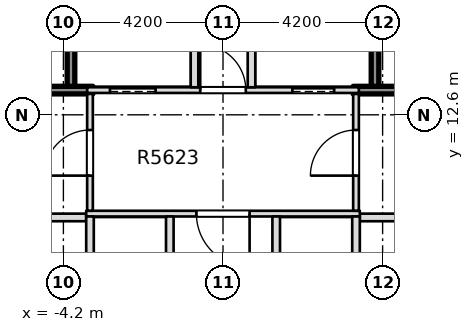
"""IFC4 building model, lengths in metres.
Left out: names, types, materials, properties, quantities, classifications, styles, units other than length and angle.
Written with IfcOpenShell. Run it as: python <this file> out.ifc"""

import sys

from ifc_helpers import new_model, si_unit, direction, frame, frame_2d, origin, place, context, subcontext, project, spatial, rectangle, extrude, element, fill, save


model = new_model("IFC4")
c1 = context("Model", 3, precision=1e-05, world=origin(), true_north=direction((0.0, 1.0)))
c2 = subcontext(c1, "Body", "Model", "MODEL_VIEW")
j1 = project(units=[si_unit("LENGTHUNIT", "METRE"), si_unit("PLANEANGLEUNIT", "RADIAN")], contexts=[c1])
p1 = place(None, origin())
s1 = spatial("IfcSite", under=j1, at=p1, CompositionType="ELEMENT")
p2 = place(p1, origin())
s2 = spatial("IfcBuilding", under=s1, at=p2, CompositionType="ELEMENT")
p3 = place(p2, frame((0.0, 0.0, 213.5)))
s3 = spatial("IfcBuildingStorey", under=s2, at=p3, CompositionType="ELEMENT", Elevation=213.5)
p4 = place(p3, frame((-7.5, 9.9, 0.0), z_axis=(0.0, 0.0, 1.0), x_axis=(1.0, 0.0, 0.0)))
e1 = element("IfcWall", 1, at=p4, inside=s3, PredefinedType="PARTITIONING", context=c2, shape_type="SweptSolid", body=[
    extrude(rectangle(XDim=3.9, YDim=0.2, at=frame_2d((1.95, 0.0))), origin(), (0.0, 0.0, 1.0), 3.0),
])
p5 = place(p4, frame((0.55, 0.0, 0.0)))
e2 = element("IfcOpeningElement", 2, at=p5, cuts=e1, PredefinedType="OPENING", context=c2, shape_type="SweptSolid", body=[
    extrude(rectangle(XDim=1.1, YDim=2.1, at=frame_2d((0.55, 1.05))), frame((0.0, 0.11, 0.0), z_axis=(0.0, -1.0, 0.0), x_axis=(1.0, 0.0, 0.0)), (0.0, 0.0, 1.0), 0.22),
])
p6 = place(p3, frame((3.6, 9.9, 0.0), z_axis=(0.0, 0.0, 1.0), x_axis=(1.0, 0.0, 0.0)))
e3 = element("IfcWall", 3, at=p6, inside=s3, PredefinedType="PARTITIONING", context=c2, shape_type="SweptSolid", body=[
    extrude(rectangle(XDim=3.9, YDim=0.2, at=frame_2d((1.95, 0.0))), origin(), (0.0, 0.0, 1.0), 3.0),
])
p7 = place(p6, frame((2.25, 0.0, 0.0)))
e4 = element("IfcOpeningElement", 4, at=p7, cuts=e3, PredefinedType="OPENING", context=c2, shape_type="SweptSolid", body=[
    extrude(rectangle(XDim=1.1, YDim=2.1, at=frame_2d((0.55, 1.05))), frame((0.0, 0.11, 0.0), z_axis=(0.0, -1.0, 0.0), x_axis=(1.0, 0.0, 0.0)), (0.0, 0.0, 1.0), 0.22),
])
p8 = place(p3, frame((-3.6, 10.0, 0.0), z_axis=(0.0, 0.0, 1.0), x_axis=(1.0, 0.0, 0.0)))
e5 = element("IfcWall", 5, at=p8, inside=s3, PredefinedType="PARTITIONING", context=c2, shape_type="SweptSolid", body=[
    extrude(rectangle(XDim=7.2, YDim=0.15, at=frame_2d((3.6, 0.0))), origin(), (0.0, 0.0, 1.0), 3.0),
])
p9 = place(p8, frame((2.9, 0.0, 0.0)))
e6 = element("IfcOpeningElement", 6, at=p9, cuts=e5, PredefinedType="OPENING", context=c2, shape_type="SweptSolid", body=[
    extrude(rectangle(XDim=1.4, YDim=2.1, at=frame_2d((0.7, 1.05))), frame((0.0, 0.085, 0.0), z_axis=(0.0, -1.0, 0.0), x_axis=(1.0, 0.0, 0.0)), (0.0, 0.0, 1.0), 0.17),
])
p10 = place(p3, frame((-7.5, 13.25, 0.0), z_axis=(0.0, 0.0, 1.0), x_axis=(1.0, 0.0, 0.0)))
e7 = element("IfcWall", 7, at=p10, inside=s3, PredefinedType="SOLIDWALL", context=c2, shape_type="SweptSolid", body=[
    extrude(rectangle(XDim=4.075, YDim=0.2, at=frame_2d((2.038, 0.0))), origin(), (0.0, 0.0, 1.0), 3.0),
])
p11 = place(p10, frame((1.05, 0.0, 0.0)))
e8 = element("IfcOpeningElement", 8, at=p11, cuts=e7, PredefinedType="OPENING", context=c2, shape_type="SweptSolid", body=[
    extrude(rectangle(XDim=1.2, YDim=2.1, at=frame_2d((0.6, 1.05))), frame((0.0, 0.11, 0.0), z_axis=(0.0, -1.0, 0.0), x_axis=(1.0, 0.0, 0.0)), (0.0, 0.0, 1.0), 0.22),
])
p12 = place(p3, frame((-3.575, 13.25, 0.0), z_axis=(0.0, 0.0, 1.0), x_axis=(1.0, 0.0, 0.0)))
e9 = element("IfcWall", 9, at=p12, inside=s3, PredefinedType="PARTITIONING", context=c2, shape_type="SweptSolid", body=[
    extrude(rectangle(XDim=7.15, YDim=0.15, at=frame_2d((3.575, 0.0))), origin(), (0.0, 0.0, 1.0), 3.0),
])
p13 = place(p12, frame((0.6, 0.0, 0.0)))
e10 = element("IfcOpeningElement", 10, at=p13, cuts=e9, PredefinedType="OPENING", context=c2, shape_type="SweptSolid", body=[
    extrude(rectangle(XDim=1.2, YDim=2.1, at=frame_2d((0.6, 1.05))), frame((0.0, 0.085, 0.0), z_axis=(0.0, -1.0, 0.0), x_axis=(1.0, 0.0, 0.0)), (0.0, 0.0, 1.0), 0.17),
])
p14 = place(p12, frame((5.4, 0.0, 0.0)))
e11 = element("IfcOpeningElement", 11, at=p14, cuts=e9, PredefinedType="OPENING", context=c2, shape_type="SweptSolid", body=[
    extrude(rectangle(XDim=1.1, YDim=2.1, at=frame_2d((0.55, 1.05))), frame((0.0, 0.085, 0.0), z_axis=(0.0, -1.0, 0.0), x_axis=(1.0, 0.0, 0.0)), (0.0, 0.0, 1.0), 0.17),
])
p15 = place(p12, frame((2.975, 0.0, 0.0)))
e12 = element("IfcOpeningElement", 12, at=p15, cuts=e9, PredefinedType="OPENING", context=c2, shape_type="SweptSolid", body=[
    extrude(rectangle(XDim=1.2, YDim=2.1, at=frame_2d((0.6, 1.05))), frame((0.0, 0.085, 0.0), z_axis=(0.0, -1.0, 0.0), x_axis=(1.0, 0.0, 0.0)), (0.0, 0.0, 1.0), 0.17),
])
p16 = place(p3, frame((3.425, 13.25, 0.0), z_axis=(0.0, 0.0, 1.0), x_axis=(1.0, 0.0, 0.0)))
e13 = element("IfcWall", 13, at=p16, inside=s3, PredefinedType="SOLIDWALL", context=c2, shape_type="SweptSolid", body=[
    extrude(rectangle(XDim=4.075, YDim=0.2, at=frame_2d((2.038, 0.0))), origin(), (0.0, 0.0, 1.0), 3.0),
])
p17 = place(p16, frame((1.825, 0.0, 0.0)))
e14 = element("IfcOpeningElement", 14, at=p17, cuts=e13, PredefinedType="OPENING", context=c2, shape_type="SweptSolid", body=[
    extrude(rectangle(XDim=1.2, YDim=2.1, at=frame_2d((0.6, 1.05))), frame((0.0, 0.11, 0.0), z_axis=(0.0, -1.0, 0.0), x_axis=(1.0, 0.0, 0.0)), (0.0, 0.0, 1.0), 0.22),
])
p18 = place(p3, frame((-4.0, 13.35, 0.0), z_axis=(0.0, 0.0, 1.0), x_axis=(0.0, 1.0, 0.0)))
e15 = element("IfcWall", 15, at=p18, inside=s3, PredefinedType="SOLIDWALL", context=c2, shape_type="SweptSolid", body=[
    extrude(rectangle(XDim=7.799, YDim=0.2, at=frame_2d((3.899, 0.0))), origin(), (0.0, 0.0, 1.0), 3.0),
])
p19 = place(p3, frame((-3.5, 7.075, 0.0), z_axis=(0.0, 0.0, 1.0), x_axis=(0.0, 1.0, 0.0)))
e16 = element("IfcWall", 16, at=p19, inside=s3, PredefinedType="PARTITIONING", context=c2, shape_type="SweptSolid", body=[
    extrude(rectangle(XDim=2.85, YDim=0.2, at=frame_2d((1.425, 0.0))), origin(), (0.0, 0.0, 1.0), 3.0),
])
p20 = place(p3, frame((-3.5, 10.075, 0.0), z_axis=(0.0, 0.0, 1.0), x_axis=(0.0, 1.0, 0.0)))
e17 = element("IfcWall", 17, at=p20, inside=s3, PredefinedType="PARTITIONING", context=c2, shape_type="SweptSolid", body=[
    extrude(rectangle(XDim=3.075, YDim=0.15, at=frame_2d((1.538, 0.0))), origin(), (0.0, 0.0, 1.0), 3.0),
])
p21 = place(p20, frame((0.925, 0.0, 0.0)))
e18 = element("IfcOpeningElement", 18, at=p21, cuts=e17, PredefinedType="OPENING", context=c2, shape_type="SweptSolid", body=[
    extrude(rectangle(XDim=1.2, YDim=2.1, at=frame_2d((0.6, 1.05))), frame((0.0, 0.085, 0.0), z_axis=(0.0, -1.0, 0.0), x_axis=(1.0, 0.0, 0.0)), (0.0, 0.0, 1.0), 0.17),
])
p22 = place(p3, frame((-1.4, 7.075, 0.0), z_axis=(0.0, 0.0, 1.0), x_axis=(0.0, 1.0, 0.0)))
e19 = element("IfcWall", 19, at=p22, inside=s3, PredefinedType="PARTITIONING", context=c2, shape_type="SweptSolid", body=[
    extrude(rectangle(XDim=2.85, YDim=0.2, at=frame_2d((1.425, 0.0))), origin(), (0.0, 0.0, 1.0), 3.0),
])
p23 = place(p3, frame((-0.75, 13.325, 0.0), z_axis=(0.0, 0.0, 1.0), x_axis=(0.0, 1.0, 0.0)))
e20 = element("IfcWall", 20, at=p23, inside=s3, PredefinedType="PARTITIONING", context=c2, shape_type="SweptSolid", body=[
    extrude(rectangle(XDim=7.824, YDim=0.2, at=frame_2d((3.912, 0.0))), origin(), (0.0, 0.0, 1.0), 3.0),
])
p24 = place(p23, frame((4.8, 0.0, 0.0)))
e21 = element("IfcOpeningElement", 21, at=p24, cuts=e20, PredefinedType="OPENING", context=c2, shape_type="SweptSolid", body=[
    extrude(rectangle(XDim=0.95, YDim=2.1, at=frame_2d((0.475, 1.05))), frame((0.0, 0.11, 0.0), z_axis=(0.0, -1.0, 0.0), x_axis=(1.0, 0.0, 0.0)), (0.0, 0.0, 1.0), 0.22),
])
p25 = place(p3, frame((0.75, 13.325, 0.0), z_axis=(0.0, 0.0, 1.0), x_axis=(0.0, 1.0, 0.0)))
e22 = element("IfcWall", 22, at=p25, inside=s3, PredefinedType="PARTITIONING", context=c2, shape_type="SweptSolid", body=[
    extrude(rectangle(XDim=2.625, YDim=0.2, at=frame_2d((1.312, 0.0))), origin(), (0.0, 0.0, 1.0), 3.0),
])
for number, where, z_axis, x_axis in (
    (23, (1.4, 7.075, 0.0), (0.0, 0.0, 1.0), (0.0, 1.0, 0.0)),
    (24, (3.5, 7.075, 0.0), (0.0, 0.0, 1.0), (0.0, 1.0, 0.0)),
):
    element("IfcWall", number, at=place(p3, frame(where, z_axis=z_axis, x_axis=x_axis)), inside=s3, PredefinedType="PARTITIONING", context=c2, shape_type="SweptSolid", body=[
        extrude(rectangle(XDim=2.85, YDim=0.2, at=frame_2d((1.425, 0.0))), origin(), (0.0, 0.0, 1.0), 3.0),
    ])
p26 = place(p3, frame((3.5, 10.075, 0.0), z_axis=(0.0, 0.0, 1.0), x_axis=(0.0, 1.0, 0.0)))
e25 = element("IfcWall", 25, at=p26, inside=s3, PredefinedType="PARTITIONING", context=c2, shape_type="SweptSolid", body=[
    extrude(rectangle(XDim=3.075, YDim=0.15, at=frame_2d((1.538, 0.0))), origin(), (0.0, 0.0, 1.0), 3.0),
])
p27 = place(p26, frame((0.925, 0.0, 0.0)))
e26 = element("IfcOpeningElement", 26, at=p27, cuts=e25, PredefinedType="OPENING", context=c2, shape_type="SweptSolid", body=[
    extrude(rectangle(XDim=1.2, YDim=2.1, at=frame_2d((0.6, 1.05))), frame((0.0, 0.085, 0.0), z_axis=(0.0, -1.0, 0.0), x_axis=(1.0, 0.0, 0.0)), (0.0, 0.0, 1.0), 0.17),
])
p28 = place(p3, frame((4.0, 13.35, 0.0), z_axis=(0.0, 0.0, 1.0), x_axis=(0.0, 1.0, 0.0)))
e27 = element("IfcWall", 27, at=p28, inside=s3, PredefinedType="SOLIDWALL", context=c2, shape_type="SweptSolid", body=[
    extrude(rectangle(XDim=2.6, YDim=0.2, at=frame_2d((1.3, 0.0))), origin(), (0.0, 0.0, 1.0), 3.0),
])
p29 = place(p9, origin())
e28 = element("IfcDoor", 28, at=p29, inside=s3, OperationType="SINGLE_SWING_RIGHT", PredefinedType="DOOR", context=c2, shape_type="SweptSolid", body=[
    extrude(rectangle(XDim=1.4, YDim=2.1, at=frame_2d((0.7, 1.05))), frame((0.0, 0.025, 0.0), z_axis=(0.0, -1.0, 0.0), x_axis=(1.0, 0.0, 0.0)), (0.0, 0.0, 1.0), 0.05),
])
fill(e6, e28)
p30 = place(p13, origin())
e29 = element("IfcDoor", 29, at=p30, inside=s3, OperationType="SLIDING_TO_RIGHT", PredefinedType="DOOR", context=c2, shape_type="SweptSolid", body=[
    extrude(rectangle(XDim=1.2, YDim=2.1, at=frame_2d((0.6, 1.05))), frame((0.0, 0.025, 0.0), z_axis=(0.0, -1.0, 0.0), x_axis=(1.0, 0.0, 0.0)), (0.0, 0.0, 1.0), 0.05),
])
fill(e10, e29)
p31 = place(p14, origin())
e30 = element("IfcDoor", 30, at=p31, inside=s3, OperationType="SLIDING_TO_LEFT", PredefinedType="DOOR", context=c2, shape_type="SweptSolid", body=[
    extrude(rectangle(XDim=1.1, YDim=2.1, at=frame_2d((0.55, 1.05))), frame((0.0, 0.025, 0.0), z_axis=(0.0, -1.0, 0.0), x_axis=(1.0, 0.0, 0.0)), (0.0, 0.0, 1.0), 0.05),
])
fill(e11, e30)
p32 = place(p15, origin())
e31 = element("IfcDoor", 31, at=p32, inside=s3, OperationType="SINGLE_SWING_RIGHT", PredefinedType="DOOR", context=c2, shape_type="SweptSolid", body=[
    extrude(rectangle(XDim=1.2, YDim=2.1, at=frame_2d((0.6, 1.05))), frame((0.0, 0.025, 0.0), z_axis=(0.0, -1.0, 0.0), x_axis=(1.0, 0.0, 0.0)), (0.0, 0.0, 1.0), 0.05),
])
fill(e12, e31)
p33 = place(p21, origin())
e32 = element("IfcDoor", 32, at=p33, inside=s3, OperationType="SINGLE_SWING_RIGHT", PredefinedType="DOOR", context=c2, shape_type="SweptSolid", body=[
    extrude(rectangle(XDim=1.2, YDim=2.1, at=frame_2d((0.6, 1.05))), frame((0.0, 0.025, 0.0), z_axis=(0.0, -1.0, 0.0), x_axis=(1.0, 0.0, 0.0)), (0.0, 0.0, 1.0), 0.05),
])
fill(e18, e32)
p34 = place(p27, origin())
e33 = element("IfcDoor", 33, at=p34, inside=s3, OperationType="SINGLE_SWING_LEFT", PredefinedType="DOOR", context=c2, shape_type="SweptSolid", body=[
    extrude(rectangle(XDim=1.2, YDim=2.1, at=frame_2d((0.6, 1.05))), frame((0.0, 0.025, 0.0), z_axis=(0.0, -1.0, 0.0), x_axis=(1.0, 0.0, 0.0)), (0.0, 0.0, 1.0), 0.05),
])
fill(e26, e33)
save(model, sys.argv[1])
